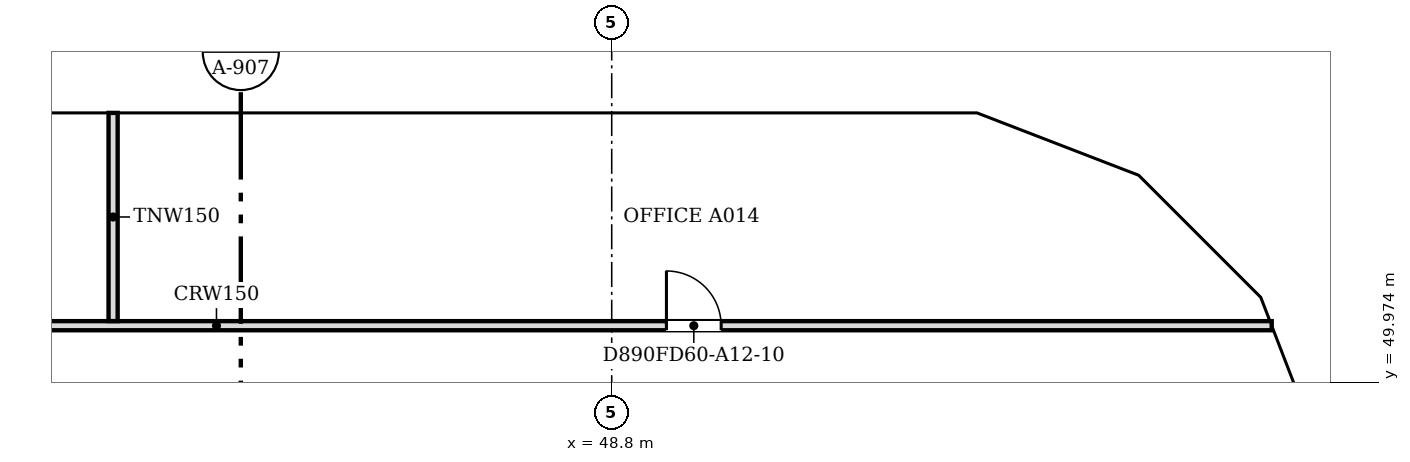
"""IFC4 building model, lengths in metres.
Left out: names, types, materials, properties, quantities, classifications, styles, units other than length and angle.
Written with IfcOpenShell. Run it as: python <this file> out.ifc"""

import sys

from ifc_helpers import new_model, si_unit, direction, frame, frame_2d, origin, place, context, subcontext, project, spatial, polyline, rectangle, outline, extrude, faceted_brep, source, transform, mapped, element, fill, save


model = new_model("IFC4")
c1 = context("Model", 3, precision=1e-05, world=origin(), true_north=direction((0.0, 1.0)))
c2 = subcontext(c1, "Body", "Model", "MODEL_VIEW")
j1 = project(units=[si_unit("LENGTHUNIT", "METRE"), si_unit("PLANEANGLEUNIT", "RADIAN")], contexts=[c1])
p1 = place(None, origin())
s1 = spatial("IfcSite", under=j1, at=p1, CompositionType="ELEMENT")
p2 = place(p1, origin())
s2 = spatial("IfcBuilding", under=s1, at=p2, CompositionType="ELEMENT")
p3 = place(p2, frame((0.0, 0.0, 135.4)))
s3 = spatial("IfcBuildingStorey", under=s2, at=p3, CompositionType="ELEMENT", Elevation=135.4)
m1 = source(origin(), c2, "Body", "Brep", [
    faceted_brep([(2.95, -0.25, 0.0), (3.003, -0.25, 0.068), (3.003, -0.25, 7.531), (2.95, -0.25, 7.6), (0.0, -0.25, 3.8), (0.047, 0.25, 3.86), (2.898, 0.25, 7.532), (2.898, 0.25, 0.068), (0.047, 0.25, 3.74), (2.95, 0.0, 0.0), (2.95, 0.0, 7.6), (0.0, 0.0, 3.8)], [[[0, 1, 2, 3, 4]], [[5, 6, 7, 8]], [[1, 0, 9]], [[10, 3, 2]], [[6, 5, 11, 4, 3, 10]], [[8, 7, 9, 0, 4, 11]], [[8, 11, 5]], [[1, 9, 7, 6, 10, 2]]]),
])
p4 = place(p3, frame((60.75, 48.753, -3.8), z_axis=(0.0, 0.0, 1.0), x_axis=(-0.35992665181, 0.932980602862, 0.0)))
e1 = element("IfcWall", 1, at=p4, inside=s3, PredefinedType="SOLIDWALL", context=c2, shape_type="MappedRepresentation", body=[
    mapped(m1, transform((0.0, 0.0, 0.0), scale=1.0)),
])
m2 = source(origin(), c2, "Body", "SweptSolid", [
    extrude(outline(polyline([(2.75, 6.935), (0.316, 3.8), (2.75, 0.665), (2.75, 6.935)])), frame((0.0, 0.26, 0.0), z_axis=(0.0, -1.0, 0.0), x_axis=(1.0, 0.0, 0.0)), (0.0, 0.0, 1.0), 0.52),
])
p5 = place(p4, origin())
e2 = element("IfcOpeningElement", 2, at=p5, cuts=e1, PredefinedType="OPENING", context=c2, shape_type="MappedRepresentation", body=[
    mapped(m2, transform((0.0, 0.0, 0.0), scale=1.0)),
])
m3 = source(origin(), c2, "Body", "Brep", [
    faceted_brep([(0.053, -0.25, 0.0), (2.997, -0.25, 3.8), (0.053, -0.25, 7.6), (0.0, -0.25, 7.532), (0.0, -0.25, 0.068), (0.106, 0.25, 7.531), (2.944, 0.25, 3.868), (2.944, 0.25, 3.732), (0.106, 0.25, 0.068), (2.997, 0.0, 3.8), (0.053, 0.0, 0.0), (0.053, 0.0, 7.6)], [[[0, 1, 2, 3, 4]], [[5, 6, 7, 8]], [[8, 7, 9, 1, 0, 10]], [[6, 5, 11, 2, 1, 9]], [[3, 2, 11]], [[10, 0, 4]], [[8, 10, 4, 3, 11, 5]], [[9, 7, 6]]]),
])
p6 = place(p3, frame((59.726, 51.469, -3.8), z_axis=(0.0, 0.0, 1.0), x_axis=(-0.707106781187, 0.707106781187, 0.0)))
e3 = element("IfcWall", 3, at=p6, inside=s3, PredefinedType="SOLIDWALL", context=c2, shape_type="MappedRepresentation", body=[
    mapped(m3, transform((0.0, 0.0, 0.0), scale=1.0)),
])
m4 = source(origin(), c2, "Body", "SweptSolid", [
    extrude(outline(polyline([(0.253, 0.666), (2.681, 3.8), (0.253, 6.934), (0.253, 0.666)])), frame((0.0, 0.26, 0.0), z_axis=(0.0, -1.0, 0.0), x_axis=(1.0, 0.0, 0.0)), (0.0, 0.0, 1.0), 0.52),
])
p7 = place(p6, origin())
e4 = element("IfcOpeningElement", 4, at=p7, cuts=e3, PredefinedType="OPENING", context=c2, shape_type="MappedRepresentation", body=[
    mapped(m4, transform((0.0, 0.0, 0.0), scale=1.0)),
])
m5 = source(origin(), c2, "Body", "Brep", [
    faceted_brep([(2.95, -0.25, 0.0), (2.997, -0.25, 0.059), (2.997, -0.25, 7.541), (2.95, -0.25, 7.6), (0.0, -0.25, 3.8), (0.053, 0.25, 3.868), (2.904, 0.25, 7.54), (2.904, 0.25, 0.06), (0.053, 0.25, 3.732), (2.95, 0.0, 0.0), (2.95, 0.0, 7.6), (0.0, 0.0, 3.8)], [[[0, 1, 2, 3, 4]], [[5, 6, 7, 8]], [[1, 0, 9]], [[10, 3, 2]], [[6, 5, 11, 4, 3, 10]], [[8, 7, 9, 0, 4, 11]], [[8, 11, 5]], [[1, 9, 7, 6, 10, 2]]]),
])
p8 = place(p3, frame((57.606, 53.588, -3.8), z_axis=(0.0, 0.0, 1.0), x_axis=(-0.932990326376, 0.359901446078, 0.0)))
e5 = element("IfcWall", 5, at=p8, inside=s3, PredefinedType="SOLIDWALL", context=c2, shape_type="MappedRepresentation", body=[
    mapped(m5, transform((0.0, 0.0, 0.0), scale=1.0)),
])
p9 = place(p8, origin())
e6 = element("IfcOpeningElement", 6, at=p9, cuts=e5, PredefinedType="OPENING", context=c2, shape_type="MappedRepresentation", body=[
    mapped(m2, transform((0.0, 0.0, 0.0), scale=1.0)),
])
m6 = source(origin(), c2, "Body", "Brep", [
    faceted_brep([(0.047, -0.25, 0.0), (3.05, -0.25, 3.8), (0.047, -0.25, 7.6), (0.0, -0.25, 7.54), (0.0, -0.25, 0.06), (0.093, 0.25, 7.541), (3.05, 0.25, 3.8), (0.093, 0.25, 0.059), (0.047, 0.0, 0.0), (0.047, 0.0, 7.6)], [[[0, 1, 2, 3, 4]], [[5, 6, 7]], [[7, 6, 1, 0, 8]], [[6, 5, 9, 2, 1]], [[3, 2, 9]], [[8, 0, 4]], [[7, 8, 4, 3, 9, 5]]]),
])
p10 = place(p3, frame((54.9, 54.65, -3.8), z_axis=(0.0, 0.0, 1.0), x_axis=(-1.0, 0.0, 0.0)))
e7 = element("IfcWall", 7, at=p10, inside=s3, PredefinedType="SOLIDWALL", context=c2, shape_type="MappedRepresentation", body=[
    mapped(m6, transform((0.0, 0.0, 0.0), scale=1.0)),
])
m7 = source(origin(), c2, "Body", "SweptSolid", [
    extrude(outline(polyline([(0.247, 0.656), (2.731, 3.8), (0.247, 6.944), (0.247, 0.656)])), frame((0.0, 0.26, 0.0), z_axis=(0.0, -1.0, 0.0), x_axis=(1.0, 0.0, 0.0)), (0.0, 0.0, 1.0), 0.52),
])
p11 = place(p10, origin())
e8 = element("IfcOpeningElement", 8, at=p11, cuts=e7, PredefinedType="OPENING", context=c2, shape_type="MappedRepresentation", body=[
    mapped(m7, transform((0.0, 0.0, 0.0), scale=1.0)),
])
m8 = source(origin(), c2, "Body", "SweptSolid", [
    extrude(outline(polyline([(3.05, 0.0), (6.1, 3.8), (3.05, 7.6), (0.0, 3.8), (3.05, 0.0)])), frame((0.0, 0.25, 0.0), z_axis=(0.0, -1.0, 0.0), x_axis=(1.0, 0.0, 0.0)), (0.0, 0.0, 1.0), 0.5),
])
p12 = place(p3, frame((51.85, 54.65, -3.8), z_axis=(0.0, 0.0, 1.0), x_axis=(-1.0, 0.0, 0.0)))
e9 = element("IfcWall", 9, at=p12, inside=s3, PredefinedType="SOLIDWALL", context=c2, shape_type="MappedRepresentation", body=[
    mapped(m8, transform((0.0, 0.0, 0.0), scale=1.0)),
])
m9 = source(origin(), c2, "Body", "SweptSolid", [
    extrude(outline(polyline([(3.05, 0.399), (5.78, 3.8), (3.05, 7.2), (0.321, 3.8), (3.05, 0.399)])), frame((0.0, 0.26, 0.0), z_axis=(0.0, -1.0, 0.0), x_axis=(1.0, 0.0, 0.0)), (0.0, 0.0, 1.0), 0.52),
])
p13 = place(p12, origin())
e10 = element("IfcOpeningElement", 10, at=p13, cuts=e9, PredefinedType="OPENING", context=c2, shape_type="MappedRepresentation", body=[
    mapped(m9, transform((0.0, 0.0, 0.0), scale=1.0)),
])
p14 = place(p3, frame((45.75, 54.65, -3.8), z_axis=(0.0, 0.0, 1.0), x_axis=(-1.0, 0.0, 0.0)))
e11 = element("IfcWall", 11, at=p14, inside=s3, PredefinedType="SOLIDWALL", context=c2, shape_type="MappedRepresentation", body=[
    mapped(m8, transform((0.0, 0.0, 0.0), scale=1.0)),
])
p15 = place(p14, origin())
e12 = element("IfcOpeningElement", 12, at=p15, cuts=e11, PredefinedType="OPENING", context=c2, shape_type="MappedRepresentation", body=[
    mapped(m9, transform((0.0, 0.0, 0.0), scale=1.0)),
])
m10 = source(origin(), c2, "Body", "Brep", [
    faceted_brep([(3.05, -0.25, 0.0), (6.1, -0.25, 3.8), (6.1, -0.25, 3.8), (3.05, -0.25, 7.6), (0.0, -0.25, 3.8), (0.0, 0.25, 3.8), (3.05, 0.25, 7.6), (6.1, 0.25, 3.8), (6.1, 0.25, 3.8), (3.05, 0.25, 0.0)], [[[0, 1, 2, 3, 4]], [[5, 6, 7, 8, 9]], [[9, 8, 1, 0]], [[7, 6, 3, 2]], [[6, 5, 4, 3]], [[5, 9, 0, 4]], [[1, 8, 7, 2]]]),
])
p16 = place(p3, frame((39.65, 54.65, -3.8), z_axis=(0.0, 0.0, 1.0), x_axis=(-1.0, 0.0, 0.0)))
e13 = element("IfcWall", 13, at=p16, inside=s3, PredefinedType="SOLIDWALL", context=c2, shape_type="MappedRepresentation", body=[
    mapped(m10, transform((0.0, 0.0, 0.0), scale=1.0)),
])
p17 = place(p16, origin())
e14 = element("IfcOpeningElement", 14, at=p17, cuts=e13, PredefinedType="OPENING", context=c2, shape_type="MappedRepresentation", body=[
    mapped(m9, transform((0.0, 0.0, 0.0), scale=1.0)),
])
p18 = place(p2, frame((0.0, 0.0, 139.2)))
s4 = spatial("IfcBuildingStorey", under=s2, at=p18, CompositionType="ELEMENT", Elevation=139.2)
m11 = source(origin(), c2, "Body", "Brep", [
    faceted_brep([(0.047, -0.25, 0.0), (2.997, -0.25, 3.8), (0.047, -0.25, 7.6), (0.0, -0.25, 7.541), (0.0, -0.25, 0.059), (0.093, 0.25, 7.54), (2.944, 0.25, 3.868), (2.944, 0.25, 3.732), (0.093, 0.25, 0.06), (2.997, 0.0, 3.8), (0.047, 0.0, 0.0), (0.047, 0.0, 7.6)], [[[0, 1, 2, 3, 4]], [[5, 6, 7, 8]], [[8, 7, 9, 1, 0, 10]], [[6, 5, 11, 2, 1, 9]], [[3, 2, 11]], [[10, 0, 4]], [[8, 10, 4, 3, 11, 5]], [[9, 7, 6]]]),
])
p19 = place(p18, frame((60.767, 48.71, -3.8), z_axis=(0.0, 0.0, 1.0), x_axis=(-0.359901446078, 0.932990326376, 0.0)))
e15 = element("IfcWall", 15, at=p19, inside=s4, PredefinedType="SOLIDWALL", context=c2, shape_type="MappedRepresentation", body=[
    mapped(m11, transform((0.0, 0.0, 0.0), scale=1.0)),
])
m12 = source(origin(), c2, "Body", "SweptSolid", [
    extrude(outline(polyline([(0.247, 0.665), (2.681, 3.8), (0.247, 6.935), (0.247, 0.665)])), frame((0.0, 0.26, 0.0), z_axis=(0.0, -1.0, 0.0), x_axis=(1.0, 0.0, 0.0)), (0.0, 0.0, 1.0), 0.52),
])
p20 = place(p19, origin())
e16 = element("IfcOpeningElement", 16, at=p20, cuts=e15, PredefinedType="OPENING", context=c2, shape_type="MappedRepresentation", body=[
    mapped(m12, transform((0.0, 0.0, 0.0), scale=1.0)),
])
m13 = source(origin(), c2, "Body", "Brep", [
    faceted_brep([(2.944, -0.25, 0.0), (2.997, -0.25, 0.068), (2.997, -0.25, 7.532), (2.944, -0.25, 7.6), (0.0, -0.25, 3.8), (0.053, 0.25, 3.868), (2.891, 0.25, 7.532), (2.891, 0.25, 0.068), (0.053, 0.25, 3.732), (2.944, 0.0, 0.0), (2.944, 0.0, 7.6), (0.0, 0.0, 3.8)], [[[0, 1, 2, 3, 4]], [[5, 6, 7, 8]], [[1, 0, 9]], [[10, 3, 2]], [[6, 5, 11, 4, 3, 10]], [[8, 7, 9, 0, 4, 11]], [[8, 11, 5]], [[1, 9, 7, 6, 10, 2]]]),
])
p21 = place(p18, frame((59.688, 51.506, -3.8), z_axis=(0.0, 0.0, 1.0), x_axis=(-0.707106781187, 0.707106781187, 0.0)))
e17 = element("IfcWall", 17, at=p21, inside=s4, PredefinedType="SOLIDWALL", context=c2, shape_type="MappedRepresentation", body=[
    mapped(m13, transform((0.0, 0.0, 0.0), scale=1.0)),
])
m14 = source(origin(), c2, "Body", "SweptSolid", [
    extrude(outline(polyline([(2.744, 6.934), (0.316, 3.8), (2.744, 0.667), (2.744, 6.934)])), frame((0.0, 0.26, 0.0), z_axis=(0.0, -1.0, 0.0), x_axis=(1.0, 0.0, 0.0)), (0.0, 0.0, 1.0), 0.52),
])
p22 = place(p21, origin())
e18 = element("IfcOpeningElement", 18, at=p22, cuts=e17, PredefinedType="OPENING", context=c2, shape_type="MappedRepresentation", body=[
    mapped(m14, transform((0.0, 0.0, 0.0), scale=1.0)),
])
m15 = source(origin(), c2, "Body", "Brep", [
    faceted_brep([(0.053, -0.25, 0.0), (3.003, -0.25, 3.8), (0.053, -0.25, 7.6), (0.0, -0.25, 7.532), (0.0, -0.25, 0.068), (0.106, 0.25, 7.532), (2.957, 0.25, 3.86), (2.957, 0.25, 3.74), (0.106, 0.25, 0.068), (3.003, 0.0, 3.8), (0.053, 0.0, 0.0), (0.053, 0.0, 7.6)], [[[0, 1, 2, 3, 4]], [[5, 6, 7, 8]], [[8, 7, 9, 1, 0, 10]], [[6, 5, 11, 2, 1, 9]], [[3, 2, 11]], [[10, 0, 4]], [[8, 10, 4, 3, 11, 5]], [[9, 7, 6]]]),
])
p23 = place(p18, frame((57.656, 53.569, -3.8), z_axis=(0.0, 0.0, 1.0), x_axis=(-0.933007896601, 0.359855894603, 0.0)))
e19 = element("IfcWall", 19, at=p23, inside=s4, PredefinedType="SOLIDWALL", context=c2, shape_type="MappedRepresentation", body=[
    mapped(m15, transform((0.0, 0.0, 0.0), scale=1.0)),
])
m16 = source(origin(), c2, "Body", "SweptSolid", [
    extrude(outline(polyline([(0.253, 0.665), (2.687, 3.8), (0.253, 6.935), (0.253, 0.665)])), frame((0.0, 0.26, 0.0), z_axis=(0.0, -1.0, 0.0), x_axis=(1.0, 0.0, 0.0)), (0.0, 0.0, 1.0), 0.52),
])
p24 = place(p23, origin())
e20 = element("IfcOpeningElement", 20, at=p24, cuts=e19, PredefinedType="OPENING", context=c2, shape_type="MappedRepresentation", body=[
    mapped(m16, transform((0.0, 0.0, 0.0), scale=1.0)),
])
m17 = source(origin(), c2, "Body", "Brep", [
    faceted_brep([(3.003, -0.25, 0.0), (6.053, -0.25, 3.8), (3.003, -0.25, 7.6), (0.0, -0.25, 3.8), (0.047, 0.25, 3.859), (3.003, 0.25, 7.6), (6.053, 0.25, 3.8), (3.003, 0.25, 0.0), (0.047, 0.25, 3.741), (0.0, 0.0, 3.8)], [[[0, 1, 2, 3]], [[4, 5, 6, 7, 8]], [[7, 6, 1, 0]], [[6, 5, 2, 1]], [[5, 4, 9, 3, 2]], [[8, 7, 0, 3, 9]], [[8, 9, 4]]]),
])
p25 = place(p18, frame((54.854, 54.65, -3.8), z_axis=(0.0, 0.0, 1.0), x_axis=(-1.0, 0.0, 0.0)))
e21 = element("IfcWall", 21, at=p25, inside=s4, PredefinedType="SOLIDWALL", context=c2, shape_type="MappedRepresentation", body=[
    mapped(m17, transform((0.0, 0.0, 0.0), scale=1.0)),
])
m18 = source(origin(), c2, "Body", "SweptSolid", [
    extrude(outline(polyline([(3.005, 0.401), (5.733, 3.8), (3.005, 7.199), (0.319, 3.8), (3.005, 0.401)])), frame((0.0, 0.26, 0.0), z_axis=(0.0, -1.0, 0.0), x_axis=(1.0, 0.0, 0.0)), (0.0, 0.0, 1.0), 0.52),
])
p26 = place(p25, origin())
e22 = element("IfcOpeningElement", 22, at=p26, cuts=e21, PredefinedType="OPENING", context=c2, shape_type="MappedRepresentation", body=[
    mapped(m18, transform((0.0, 0.0, 0.0), scale=1.0)),
])
m19 = source(origin(), c2, "Body", "SweptSolid", [
    extrude(outline(polyline([(3.05, 0.0), (6.1, 3.8), (3.05, 7.6), (0.0, 3.8), (3.05, 0.0)])), frame((0.0, 0.25, 0.0), z_axis=(0.0, -1.0, 0.0), x_axis=(1.0, 0.0, 0.0)), (0.0, 0.0, 1.0), 0.5),
])
p27 = place(p18, frame((48.8, 54.65, -3.8), z_axis=(0.0, 0.0, 1.0), x_axis=(-1.0, 0.0, 0.0)))
e23 = element("IfcWall", 23, at=p27, inside=s4, PredefinedType="SOLIDWALL", context=c2, shape_type="MappedRepresentation", body=[
    mapped(m19, transform((0.0, 0.0, 0.0), scale=1.0)),
])
m20 = source(origin(), c2, "Body", "SweptSolid", [
    extrude(outline(polyline([(3.05, 0.399), (5.78, 3.8), (3.05, 7.201), (0.321, 3.8), (3.05, 0.399)])), frame((0.0, 0.26, 0.0), z_axis=(0.0, -1.0, 0.0), x_axis=(1.0, 0.0, 0.0)), (0.0, 0.0, 1.0), 0.52),
])
p28 = place(p27, origin())
e24 = element("IfcOpeningElement", 24, at=p28, cuts=e23, PredefinedType="OPENING", context=c2, shape_type="MappedRepresentation", body=[
    mapped(m20, transform((0.0, 0.0, 0.0), scale=1.0)),
])
m21 = source(origin(), c2, "Body", "Brep", [
    faceted_brep([(3.05, -0.25, 0.0), (6.1, -0.25, 3.8), (6.1, -0.25, 3.8), (3.05, -0.25, 7.6), (0.0, -0.25, 3.8), (0.0, 0.25, 3.8), (3.05, 0.25, 7.6), (6.1, 0.25, 3.8), (6.1, 0.25, 3.8), (3.05, 0.25, 0.0)], [[[0, 1, 2, 3, 4]], [[5, 6, 7, 8, 9]], [[9, 8, 1, 0]], [[7, 6, 3, 2]], [[6, 5, 4, 3]], [[5, 9, 0, 4]], [[1, 8, 7, 2]]]),
])
p29 = place(p18, frame((42.7, 54.65, -3.8), z_axis=(0.0, 0.0, 1.0), x_axis=(-1.0, 0.0, 0.0)))
e25 = element("IfcWall", 25, at=p29, inside=s4, PredefinedType="SOLIDWALL", context=c2, shape_type="MappedRepresentation", body=[
    mapped(m21, transform((0.0, 0.0, 0.0), scale=1.0)),
])
p30 = place(p29, origin())
e26 = element("IfcOpeningElement", 26, at=p30, cuts=e25, PredefinedType="OPENING", context=c2, shape_type="MappedRepresentation", body=[
    mapped(m20, transform((0.0, 0.0, 0.0), scale=1.0)),
])
p31 = place(p3, frame((28.4, 50.9, 0.0), z_axis=(0.0, 0.0, 1.0), x_axis=(1.0, 0.0, 0.0)))
e27 = element("IfcWall", 27, at=p31, inside=s3, PredefinedType="PARTITIONING", context=c2, shape_type="SweptSolid", body=[
    extrude(rectangle(XDim=31.254, YDim=0.15, at=frame_2d((15.627, 0.0))), origin(), (0.0, 0.0, 1.0), 3.067),
])
m22 = source(origin(), c2, "Body", "SweptSolid", [
    extrude(rectangle(XDim=0.9, YDim=2.1, at=frame_2d((0.45, 1.05))), frame((0.0, 0.085, 0.0), z_axis=(0.0, -1.0, 0.0), x_axis=(1.0, 0.0, 0.0)), (0.0, 0.0, 1.0), 0.17),
])
p32 = place(p31, frame((5.6, 0.0, 0.0)))
e28 = element("IfcOpeningElement", 28, at=p32, cuts=e27, PredefinedType="OPENING", context=c2, shape_type="MappedRepresentation", body=[
    mapped(m22, transform((0.0, 0.0, 0.0), scale=1.0)),
])
p33 = place(p31, frame((21.3, 0.0, 0.0)))
e29 = element("IfcOpeningElement", 29, at=p33, cuts=e27, PredefinedType="OPENING", context=c2, shape_type="MappedRepresentation", body=[
    mapped(m22, transform((0.0, 0.0, 0.0), scale=1.0)),
])
p34 = place(p3, frame((40.6, 50.976, 0.0), z_axis=(0.0, 0.0, 1.0), x_axis=(0.0, 1.0, 0.0)))
e30 = element("IfcWall", 30, at=p34, inside=s3, PredefinedType="PARTITIONING", context=c2, shape_type="SweptSolid", body=[
    extrude(rectangle(XDim=3.424, YDim=0.15, at=frame_2d((1.712, 0.0))), origin(), (0.0, 0.0, 1.0), 3.067),
])
m23 = source(origin(), c2, "Body", "SweptSolid", [
    extrude(rectangle(XDim=0.9, YDim=2.1, at=frame_2d((0.45, 1.05))), frame((0.0, 0.025, 0.0), z_axis=(0.0, -1.0, 0.0), x_axis=(1.0, 0.0, 0.0)), (0.0, 0.0, 1.0), 0.05),
])
p35 = place(p33, origin())
e31 = element("IfcDoor", 31, at=p35, inside=s3, OperationType="SINGLE_SWING_LEFT", PredefinedType="DOOR", context=c2, shape_type="MappedRepresentation", body=[
    mapped(m23, transform((0.0, 0.0, 0.0), scale=1.0)),
])
fill(e29, e31)
save(model, sys.argv[1])
